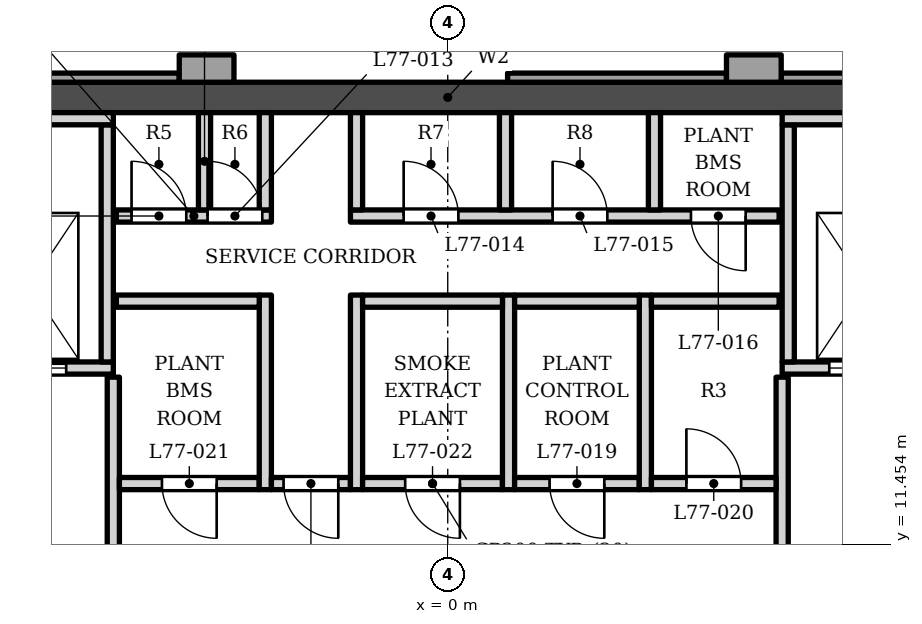
"""IFC4 building model, lengths in metres.
Left out: names, types, materials, properties, quantities, classifications, styles, units other than length and angle.
Written with IfcOpenShell. Run it as: python <this file> out.ifc"""

import sys

from ifc_helpers import new_model, si_unit, direction, frame, frame_2d, origin, place, context, subcontext, project, spatial, polyline, rectangle, outline, extrude, element, fill, save


model = new_model("IFC4")
c1 = context("Model", 3, precision=1e-05, world=origin(), true_north=direction((0.0, 1.0)))
c2 = subcontext(c1, "Body", "Model", "MODEL_VIEW")
j1 = project(units=[si_unit("LENGTHUNIT", "METRE"), si_unit("PLANEANGLEUNIT", "RADIAN")], contexts=[c1])
p1 = place(None, origin())
s1 = spatial("IfcSite", under=j1, at=p1, CompositionType="ELEMENT")
p2 = place(p1, origin())
s2 = spatial("IfcBuilding", under=s1, at=p2, CompositionType="ELEMENT")
p3 = place(p2, frame((0.0, 0.0, 330.5)))
s3 = spatial("IfcBuildingStorey", under=s2, at=p3, CompositionType="ELEMENT", Elevation=330.5)
p4 = place(p3, frame((-12.1, 18.802, 0.0), z_axis=(0.0, 0.0, 1.0), x_axis=(1.0, 0.0, 0.0)))
e1 = element("IfcWall", 1, at=p4, inside=s3, PredefinedType="SHEAR", context=c2, shape_type="SweptSolid", body=[
    extrude(rectangle(XDim=24.2, YDim=0.5, at=frame_2d((12.1, 0.0))), origin(), (0.0, 0.0, 1.0), 5.0),
])
p5 = place(p3, origin())
e2 = element("IfcWall", 2, at=p5, inside=s3, PredefinedType="SOLIDWALL", context=c2, shape_type="SweptSolid", body=[
    extrude(outline(polyline([(4.584, 19.502), (4.584, 19.052), (5.484, 19.052), (5.484, 19.502), (4.584, 19.502)])), origin(), (0.0, 0.0, 1.0), 3.8),
])
p6 = place(p3, origin())
e3 = element("IfcWall", 3, at=p6, inside=s3, PredefinedType="SOLIDWALL", context=c2, shape_type="SweptSolid", body=[
    extrude(outline(polyline([(-4.416, 19.502), (-4.416, 19.052), (-3.516, 19.052), (-3.516, 19.502), (-4.416, 19.502)])), origin(), (0.0, 0.0, 1.0), 3.8),
])
p7 = place(p3, origin())
e4 = element("IfcWall", 4, at=p7, inside=s3, PredefinedType="ELEMENTEDWALL", context=c2, shape_type="SweptSolid", body=[
    extrude(outline(polyline([(9.084, 19.203), (5.484, 19.203), (5.484, 19.052), (9.084, 19.052), (9.084, 19.203)])), origin(), (0.0, 0.0, 1.0), 3.8),
])
p8 = place(p3, origin())
e5 = element("IfcWall", 5, at=p8, inside=s3, PredefinedType="ELEMENTEDWALL", context=c2, shape_type="SweptSolid", body=[
    extrude(outline(polyline([(4.584, 19.203), (0.984, 19.203), (0.984, 19.052), (4.584, 19.052), (4.584, 19.203)])), origin(), (0.0, 0.0, 1.0), 3.8),
])
p9 = place(p3, origin())
e6 = element("IfcWall", 6, at=p9, inside=s3, PredefinedType="ELEMENTEDWALL", context=c2, shape_type="SweptSolid", body=[
    extrude(outline(polyline([(-4.416, 19.203), (-8.016, 19.203), (-8.016, 19.052), (-4.416, 19.052), (-4.416, 19.203)])), origin(), (0.0, 0.0, 1.0), 3.8),
])
p10 = place(p3, frame((-5.5, 6.353, 0.0), z_axis=(0.0, 0.0, 1.0), x_axis=(0.0, 1.0, 0.0)))
e7 = element("IfcWall", 7, at=p10, inside=s3, PredefinedType="SOLIDWALL", context=c2, shape_type="SweptSolid", body=[
    extrude(rectangle(XDim=7.85, YDim=0.2, at=frame_2d((3.925, 0.0))), origin(), (0.0, 0.0, 1.0), 4.8),
])
p11 = place(p10, frame((3.6, 0.0, 0.0)))
e8 = element("IfcOpeningElement", 8, at=p11, cuts=e7, PredefinedType="OPENING", context=c2, shape_type="SweptSolid", body=[
    extrude(rectangle(XDim=1.4, YDim=2.1, at=frame_2d((0.7, 1.05))), frame((0.0, 0.11, 0.0), z_axis=(0.0, -1.0, 0.0), x_axis=(1.0, 0.0, 0.0)), (0.0, 0.0, 1.0), 0.22),
])
p12 = place(p3, frame((5.5, 6.353, 0.0), z_axis=(0.0, 0.0, 1.0), x_axis=(0.0, 1.0, 0.0)))
e9 = element("IfcWall", 9, at=p12, inside=s3, PredefinedType="SOLIDWALL", context=c2, shape_type="SweptSolid", body=[
    extrude(rectangle(XDim=7.85, YDim=0.2, at=frame_2d((3.925, 0.0))), origin(), (0.0, 0.0, 1.0), 4.8),
])
p13 = place(p12, frame((3.6, 0.0, 0.0)))
e10 = element("IfcOpeningElement", 10, at=p13, cuts=e9, PredefinedType="OPENING", context=c2, shape_type="SweptSolid", body=[
    extrude(rectangle(XDim=1.4, YDim=2.1, at=frame_2d((0.7, 1.05))), frame((0.0, 0.11, 0.0), z_axis=(0.0, -1.0, 0.0), x_axis=(1.0, 0.0, 0.0)), (0.0, 0.0, 1.0), 0.22),
])
p14 = place(p3, frame((-5.4, 12.453, 0.0), z_axis=(0.0, 0.0, 1.0), x_axis=(1.0, 0.0, 0.0)))
e11 = element("IfcWall", 11, at=p14, inside=s3, PredefinedType="PARTITIONING", context=c2, shape_type="SweptSolid", body=[
    extrude(rectangle(XDim=2.3, YDim=0.2, at=frame_2d((1.15, 0.0))), origin(), (0.0, 0.0, 1.0), 4.8),
])
p15 = place(p14, frame((0.7, 0.0, 0.0)))
e12 = element("IfcOpeningElement", 12, at=p15, cuts=e11, PredefinedType="OPENING", context=c2, shape_type="SweptSolid", body=[
    extrude(rectangle(XDim=0.9, YDim=2.1, at=frame_2d((0.45, 1.05))), frame((0.0, 0.11, 0.0), z_axis=(0.0, -1.0, 0.0), x_axis=(1.0, 0.0, 0.0)), (0.0, 0.0, 1.0), 0.22),
])
p16 = place(p3, frame((-3.0, 12.353, 0.0), z_axis=(0.0, 0.0, 1.0), x_axis=(0.0, 1.0, 0.0)))
e13 = element("IfcWall", 13, at=p16, inside=s3, PredefinedType="PARTITIONING", context=c2, shape_type="SweptSolid", body=[
    extrude(rectangle(XDim=3.2, YDim=0.2, at=frame_2d((1.6, 0.0))), origin(), (0.0, 0.0, 1.0), 4.8),
])
p17 = place(p3, frame((-2.9, 12.453, 0.0), z_axis=(0.0, 0.0, 1.0), x_axis=(1.0, 0.0, 0.0)))
e14 = element("IfcWall", 14, at=p17, inside=s3, PredefinedType="PARTITIONING", context=c2, shape_type="SweptSolid", body=[
    extrude(rectangle(XDim=1.3, YDim=0.2, at=frame_2d((0.65, 0.0))), origin(), (0.0, 0.0, 1.0), 4.8),
])
p18 = place(p17, frame((0.2, 0.0, 0.0)))
e15 = element("IfcOpeningElement", 15, at=p18, cuts=e14, PredefinedType="OPENING", context=c2, shape_type="SweptSolid", body=[
    extrude(rectangle(XDim=0.9, YDim=2.1, at=frame_2d((0.45, 1.05))), frame((0.0, 0.11, 0.0), z_axis=(0.0, -1.0, 0.0), x_axis=(1.0, 0.0, 0.0)), (0.0, 0.0, 1.0), 0.22),
])
p19 = place(p3, frame((-1.5, 12.353, 0.0), z_axis=(0.0, 0.0, 1.0), x_axis=(0.0, 1.0, 0.0)))
e16 = element("IfcWall", 16, at=p19, inside=s3, PredefinedType="PARTITIONING", context=c2, shape_type="SweptSolid", body=[
    extrude(rectangle(XDim=3.2, YDim=0.2, at=frame_2d((1.6, 0.0))), origin(), (0.0, 0.0, 1.0), 4.8),
])
p20 = place(p3, frame((-1.4, 12.453, 0.0), z_axis=(0.0, 0.0, 1.0), x_axis=(1.0, 0.0, 0.0)))
e17 = element("IfcWall", 17, at=p20, inside=s3, PredefinedType="PARTITIONING", context=c2, shape_type="SweptSolid", body=[
    extrude(rectangle(XDim=2.3, YDim=0.2, at=frame_2d((1.15, 0.0))), origin(), (0.0, 0.0, 1.0), 4.8),
])
p21 = place(p20, frame((0.7, 0.0, 0.0)))
e18 = element("IfcOpeningElement", 18, at=p21, cuts=e17, PredefinedType="OPENING", context=c2, shape_type="SweptSolid", body=[
    extrude(rectangle(XDim=0.9, YDim=2.1, at=frame_2d((0.45, 1.05))), frame((0.0, 0.11, 0.0), z_axis=(0.0, -1.0, 0.0), x_axis=(1.0, 0.0, 0.0)), (0.0, 0.0, 1.0), 0.22),
])
p22 = place(p3, frame((1.0, 12.353, 0.0), z_axis=(0.0, 0.0, 1.0), x_axis=(0.0, 1.0, 0.0)))
e19 = element("IfcWall", 19, at=p22, inside=s3, PredefinedType="PARTITIONING", context=c2, shape_type="SweptSolid", body=[
    extrude(rectangle(XDim=3.2, YDim=0.2, at=frame_2d((1.6, 0.0))), origin(), (0.0, 0.0, 1.0), 4.8),
])
p23 = place(p3, frame((1.1, 12.453, 0.0), z_axis=(0.0, 0.0, 1.0), x_axis=(1.0, 0.0, 0.0)))
e20 = element("IfcWall", 20, at=p23, inside=s3, PredefinedType="PARTITIONING", context=c2, shape_type="SweptSolid", body=[
    extrude(rectangle(XDim=2.05, YDim=0.2, at=frame_2d((1.025, 0.0))), origin(), (0.0, 0.0, 1.0), 4.8),
])
p24 = place(p23, frame((0.575, 0.0, 0.0)))
e21 = element("IfcOpeningElement", 21, at=p24, cuts=e20, PredefinedType="OPENING", context=c2, shape_type="SweptSolid", body=[
    extrude(rectangle(XDim=0.9, YDim=2.1, at=frame_2d((0.45, 1.05))), frame((0.0, 0.11, 0.0), z_axis=(0.0, -1.0, 0.0), x_axis=(1.0, 0.0, 0.0)), (0.0, 0.0, 1.0), 0.22),
])
p25 = place(p3, frame((3.25, 12.353, 0.0), z_axis=(0.0, 0.0, 1.0), x_axis=(0.0, 1.0, 0.0)))
e22 = element("IfcWall", 22, at=p25, inside=s3, PredefinedType="PARTITIONING", context=c2, shape_type="SweptSolid", body=[
    extrude(rectangle(XDim=3.2, YDim=0.2, at=frame_2d((1.6, 0.0))), origin(), (0.0, 0.0, 1.0), 4.8),
])
p26 = place(p3, frame((3.35, 12.453, 0.0), z_axis=(0.0, 0.0, 1.0), x_axis=(1.0, 0.0, 0.0)))
e23 = element("IfcWall", 23, at=p26, inside=s3, PredefinedType="PARTITIONING", context=c2, shape_type="SweptSolid", body=[
    extrude(rectangle(XDim=2.05, YDim=0.2, at=frame_2d((1.025, 0.0))), origin(), (0.0, 0.0, 1.0), 4.8),
])
p27 = place(p26, frame((0.575, 0.0, 0.0)))
e24 = element("IfcOpeningElement", 24, at=p27, cuts=e23, PredefinedType="OPENING", context=c2, shape_type="SweptSolid", body=[
    extrude(rectangle(XDim=0.9, YDim=2.1, at=frame_2d((0.45, 1.05))), frame((0.0, 0.11, 0.0), z_axis=(0.0, -1.0, 0.0), x_axis=(1.0, 0.0, 0.0)), (0.0, 0.0, 1.0), 0.22),
])
p28 = place(p3, frame((-8.05, 14.353, 0.0), z_axis=(0.0, 0.0, 1.0), x_axis=(1.0, 0.0, 0.0)))
e25 = element("IfcWall", 25, at=p28, inside=s3, PredefinedType="SOLIDWALL", context=c2, shape_type="SweptSolid", body=[
    extrude(rectangle(XDim=2.55, YDim=0.2, at=frame_2d((1.275, 0.0))), origin(), (0.0, 0.0, 1.0), 4.8),
])
p29 = place(p28, frame((0.575, 0.0, 0.0)))
e26 = element("IfcOpeningElement", 26, at=p29, cuts=e25, PredefinedType="OPENING", context=c2, shape_type="SweptSolid", body=[
    extrude(rectangle(XDim=1.2, YDim=2.1, at=frame_2d((0.6, 1.05))), frame((0.0, 0.11, 0.0), z_axis=(0.0, -1.0, 0.0), x_axis=(1.0, 0.0, 0.0)), (0.0, 0.0, 1.0), 0.22),
])
p30 = place(p3, frame((5.5, 14.353, 0.0), z_axis=(0.0, 0.0, 1.0), x_axis=(1.0, 0.0, 0.0)))
e27 = element("IfcWall", 27, at=p30, inside=s3, PredefinedType="SOLIDWALL", context=c2, shape_type="SweptSolid", body=[
    extrude(rectangle(XDim=2.55, YDim=0.2, at=frame_2d((1.275, 0.0))), origin(), (0.0, 0.0, 1.0), 4.8),
])
p31 = place(p30, frame((0.775, 0.0, 0.0)))
e28 = element("IfcOpeningElement", 28, at=p31, cuts=e27, PredefinedType="OPENING", context=c2, shape_type="SweptSolid", body=[
    extrude(rectangle(XDim=1.2, YDim=2.1, at=frame_2d((0.6, 1.05))), frame((0.0, 0.11, 0.0), z_axis=(0.0, -1.0, 0.0), x_axis=(1.0, 0.0, 0.0)), (0.0, 0.0, 1.0), 0.22),
])
for number, where, z_axis, x_axis in (
    (29, (-5.6, 14.453, 0.0), (0.0, 0.0, 1.0), (0.0, 1.0, 0.0)),
    (30, (5.6, 14.453, 0.0), (0.0, 0.0, 1.0), (0.0, 1.0, 0.0)),
):
    element("IfcWall", number, at=place(p3, frame(where, z_axis=z_axis, x_axis=x_axis)), inside=s3, PredefinedType="SOLIDWALL", context=c2, shape_type="SweptSolid", body=[
        extrude(rectangle(XDim=3.9, YDim=0.2, at=frame_2d((1.95, 0.0))), origin(), (0.0, 0.0, 1.0), 4.8),
    ])
p32 = place(p3, frame((-5.45, 15.453, 0.0), z_axis=(0.0, 0.0, 1.0), x_axis=(1.0, 0.0, 0.0)))
e31 = element("IfcWall", 31, at=p32, inside=s3, PredefinedType="SOLIDWALL", context=c2, shape_type="SweptSolid", body=[
    extrude(rectangle(XDim=2.35, YDim=0.2, at=frame_2d((1.175, 0.0))), origin(), (0.0, 0.0, 1.0), 4.8),
])
p33 = place(p3, frame((-1.4, 15.453, 0.0), z_axis=(0.0, 0.0, 1.0), x_axis=(1.0, 0.0, 0.0)))
e32 = element("IfcWall", 32, at=p33, inside=s3, PredefinedType="PARTITIONING", context=c2, shape_type="SweptSolid", body=[
    extrude(rectangle(XDim=2.3, YDim=0.2, at=frame_2d((1.15, 0.0))), origin(), (0.0, 0.0, 1.0), 4.8),
])
p34 = place(p3, frame((1.1, 15.453, 0.0), z_axis=(0.0, 0.0, 1.0), x_axis=(1.0, 0.0, 0.0)))
e33 = element("IfcWall", 33, at=p34, inside=s3, PredefinedType="PARTITIONING", context=c2, shape_type="SweptSolid", body=[
    extrude(rectangle(XDim=2.05, YDim=0.2, at=frame_2d((1.025, 0.0))), origin(), (0.0, 0.0, 1.0), 4.8),
])
p35 = place(p3, frame((3.35, 15.453, 0.0), z_axis=(0.0, 0.0, 1.0), x_axis=(1.0, 0.0, 0.0)))
e34 = element("IfcWall", 34, at=p35, inside=s3, PredefinedType="SOLIDWALL", context=c2, shape_type="SweptSolid", body=[
    extrude(rectangle(XDim=2.1, YDim=0.2, at=frame_2d((1.05, 0.0))), origin(), (0.0, 0.0, 1.0), 4.8),
])
p36 = place(p3, frame((-5.45, 16.853, 0.0), z_axis=(0.0, 0.0, 1.0), x_axis=(1.0, 0.0, 0.0)))
e35 = element("IfcWall", 35, at=p36, inside=s3, PredefinedType="SOLIDWALL", context=c2, shape_type="SweptSolid", body=[
    extrude(rectangle(XDim=2.55, YDim=0.2, at=frame_2d((1.275, 0.0))), origin(), (0.0, 0.0, 1.0), 4.8),
])
p37 = place(p36, frame((0.25, 0.0, 0.0)))
e36 = element("IfcOpeningElement", 36, at=p37, cuts=e35, PredefinedType="OPENING", context=c2, shape_type="SweptSolid", body=[
    extrude(rectangle(XDim=0.9, YDim=2.1, at=frame_2d((0.45, 1.05))), frame((0.0, 0.11, 0.0), z_axis=(0.0, -1.0, 0.0), x_axis=(1.0, 0.0, 0.0)), (0.0, 0.0, 1.0), 0.22),
])
p38 = place(p36, frame((1.5, 0.0, 0.0)))
e37 = element("IfcOpeningElement", 37, at=p38, cuts=e35, PredefinedType="OPENING", context=c2, shape_type="SweptSolid", body=[
    extrude(rectangle(XDim=0.9, YDim=2.1, at=frame_2d((0.45, 1.05))), frame((0.0, 0.11, 0.0), z_axis=(0.0, -1.0, 0.0), x_axis=(1.0, 0.0, 0.0)), (0.0, 0.0, 1.0), 0.22),
])
p39 = place(p3, frame((-1.6, 16.853, 0.0), z_axis=(0.0, 0.0, 1.0), x_axis=(1.0, 0.0, 0.0)))
e38 = element("IfcWall", 38, at=p39, inside=s3, PredefinedType="SOLIDWALL", context=c2, shape_type="SweptSolid", body=[
    extrude(rectangle(XDim=7.05, YDim=0.2, at=frame_2d((3.525, 0.0))), origin(), (0.0, 0.0, 1.0), 4.8),
])
p40 = place(p39, frame((0.875, 0.0, 0.0)))
e39 = element("IfcOpeningElement", 39, at=p40, cuts=e38, PredefinedType="OPENING", context=c2, shape_type="SweptSolid", body=[
    extrude(rectangle(XDim=0.9, YDim=2.1, at=frame_2d((0.45, 1.05))), frame((0.0, 0.11, 0.0), z_axis=(0.0, -1.0, 0.0), x_axis=(1.0, 0.0, 0.0)), (0.0, 0.0, 1.0), 0.22),
])
p41 = place(p39, frame((3.325, 0.0, 0.0)))
e40 = element("IfcOpeningElement", 40, at=p41, cuts=e38, PredefinedType="OPENING", context=c2, shape_type="SweptSolid", body=[
    extrude(rectangle(XDim=0.9, YDim=2.1, at=frame_2d((0.45, 1.05))), frame((0.0, 0.11, 0.0), z_axis=(0.0, -1.0, 0.0), x_axis=(1.0, 0.0, 0.0)), (0.0, 0.0, 1.0), 0.22),
])
p42 = place(p39, frame((5.6, 0.0, 0.0)))
e41 = element("IfcOpeningElement", 41, at=p42, cuts=e38, PredefinedType="OPENING", context=c2, shape_type="SweptSolid", body=[
    extrude(rectangle(XDim=0.9, YDim=2.1, at=frame_2d((0.45, 1.05))), frame((0.0, 0.11, 0.0), z_axis=(0.0, -1.0, 0.0), x_axis=(1.0, 0.0, 0.0)), (0.0, 0.0, 1.0), 0.22),
])
for number, where, z_axis, x_axis in (
    (42, (-4.0, 16.953, 0.0), (0.0, 0.0, 1.0), (0.0, 1.0, 0.0)),
    (43, (-3.0, 16.953, 0.0), (0.0, 0.0, 1.0), (0.0, 1.0, 0.0)),
    (44, (-1.5, 16.953, 0.0), (0.0, 0.0, 1.0), (0.0, 1.0, 0.0)),
    (45, (0.95, 16.953, 0.0), (0.0, 0.0, 1.0), (0.0, 1.0, 0.0)),
    (46, (3.4, 16.953, 0.0), (0.0, 0.0, 1.0), (0.0, 1.0, 0.0)),
):
    element("IfcWall", number, at=place(p3, frame(where, z_axis=z_axis, x_axis=x_axis)), inside=s3, PredefinedType="PARTITIONING", context=c2, shape_type="SweptSolid", body=[
        extrude(rectangle(XDim=1.6, YDim=0.2, at=frame_2d((0.8, 0.0))), origin(), (0.0, 0.0, 1.0), 4.8),
    ])
for number, where, z_axis, x_axis in (
    (47, (-8.05, 18.453, 0.0), (0.0, 0.0, 1.0), (1.0, 0.0, 0.0)),
    (48, (5.5, 18.453, 0.0), (0.0, 0.0, 1.0), (1.0, 0.0, 0.0)),
):
    element("IfcWall", number, at=place(p3, frame(where, z_axis=z_axis, x_axis=x_axis)), inside=s3, PredefinedType="SOLIDWALL", context=c2, shape_type="SweptSolid", body=[
        extrude(rectangle(XDim=2.55, YDim=0.2, at=frame_2d((1.275, 0.0))), origin(), (0.0, 0.0, 1.0), 4.8),
    ])
p43 = place(p29, origin())
e49 = element("IfcDoor", 49, at=p43, inside=s3, OperationType="DOUBLE_DOOR_SLIDING", PredefinedType="DOOR", context=c2, shape_type="SweptSolid", body=[
    extrude(rectangle(XDim=1.2, YDim=2.1, at=frame_2d((0.6, 1.05))), frame((0.0, 0.025, 0.0), z_axis=(0.0, -1.0, 0.0), x_axis=(1.0, 0.0, 0.0)), (0.0, 0.0, 1.0), 0.05),
])
fill(e26, e49)
p44 = place(p31, origin())
e50 = element("IfcDoor", 50, at=p44, inside=s3, OperationType="DOUBLE_DOOR_SLIDING", PredefinedType="DOOR", context=c2, shape_type="SweptSolid", body=[
    extrude(rectangle(XDim=1.2, YDim=2.1, at=frame_2d((0.6, 1.05))), frame((0.0, 0.025, 0.0), z_axis=(0.0, -1.0, 0.0), x_axis=(1.0, 0.0, 0.0)), (0.0, 0.0, 1.0), 0.05),
])
fill(e28, e50)
p45 = place(p18, origin())
e51 = element("IfcDoor", 51, at=p45, inside=s3, OperationType="SINGLE_SWING_RIGHT", PredefinedType="DOOR", context=c2, shape_type="SweptSolid", body=[
    extrude(rectangle(XDim=0.9, YDim=2.1, at=frame_2d((0.45, 1.05))), frame((0.0, 0.025, 0.0), z_axis=(0.0, -1.0, 0.0), x_axis=(1.0, 0.0, 0.0)), (0.0, 0.0, 1.0), 0.05),
])
fill(e15, e51)
p46 = place(p37, origin())
e52 = element("IfcDoor", 52, at=p46, inside=s3, OperationType="SINGLE_SWING_LEFT", PredefinedType="DOOR", context=c2, shape_type="SweptSolid", body=[
    extrude(rectangle(XDim=0.9, YDim=2.1, at=frame_2d((0.45, 1.05))), frame((0.0, 0.025, 0.0), z_axis=(0.0, -1.0, 0.0), x_axis=(1.0, 0.0, 0.0)), (0.0, 0.0, 1.0), 0.05),
])
fill(e36, e52)
p47 = place(p38, origin())
e53 = element("IfcDoor", 53, at=p47, inside=s3, OperationType="SINGLE_SWING_LEFT", PredefinedType="DOOR", context=c2, shape_type="SweptSolid", body=[
    extrude(rectangle(XDim=0.9, YDim=2.1, at=frame_2d((0.45, 1.05))), frame((0.0, 0.025, 0.0), z_axis=(0.0, -1.0, 0.0), x_axis=(1.0, 0.0, 0.0)), (0.0, 0.0, 1.0), 0.05),
])
fill(e37, e53)
p48 = place(p40, origin())
e54 = element("IfcDoor", 54, at=p48, inside=s3, OperationType="SINGLE_SWING_LEFT", PredefinedType="DOOR", context=c2, shape_type="SweptSolid", body=[
    extrude(rectangle(XDim=0.9, YDim=2.1, at=frame_2d((0.45, 1.05))), frame((0.0, 0.025, 0.0), z_axis=(0.0, -1.0, 0.0), x_axis=(1.0, 0.0, 0.0)), (0.0, 0.0, 1.0), 0.05),
])
fill(e39, e54)
p49 = place(p41, origin())
e55 = element("IfcDoor", 55, at=p49, inside=s3, OperationType="SINGLE_SWING_LEFT", PredefinedType="DOOR", context=c2, shape_type="SweptSolid", body=[
    extrude(rectangle(XDim=0.9, YDim=2.1, at=frame_2d((0.45, 1.05))), frame((0.0, 0.025, 0.0), z_axis=(0.0, -1.0, 0.0), x_axis=(1.0, 0.0, 0.0)), (0.0, 0.0, 1.0), 0.05),
])
fill(e40, e55)
p50 = place(p42, origin())
e56 = element("IfcDoor", 56, at=p50, inside=s3, OperationType="SINGLE_SWING_RIGHT", PredefinedType="DOOR", context=c2, shape_type="SweptSolid", body=[
    extrude(rectangle(XDim=0.9, YDim=2.1, at=frame_2d((0.45, 1.05))), frame((0.0, 0.025, 0.0), z_axis=(0.0, -1.0, 0.0), x_axis=(1.0, 0.0, 0.0)), (0.0, 0.0, 1.0), 0.05),
])
fill(e41, e56)
p51 = place(p24, origin())
e57 = element("IfcDoor", 57, at=p51, inside=s3, OperationType="SINGLE_SWING_RIGHT", PredefinedType="DOOR", context=c2, shape_type="SweptSolid", body=[
    extrude(rectangle(XDim=0.9, YDim=2.1, at=frame_2d((0.45, 1.05))), frame((0.0, 0.025, 0.0), z_axis=(0.0, -1.0, 0.0), x_axis=(1.0, 0.0, 0.0)), (0.0, 0.0, 1.0), 0.05),
])
fill(e21, e57)
p52 = place(p27, origin())
e58 = element("IfcDoor", 58, at=p52, inside=s3, OperationType="SINGLE_SWING_LEFT", PredefinedType="DOOR", context=c2, shape_type="SweptSolid", body=[
    extrude(rectangle(XDim=0.9, YDim=2.1, at=frame_2d((0.45, 1.05))), frame((0.0, 0.025, 0.0), z_axis=(0.0, -1.0, 0.0), x_axis=(1.0, 0.0, 0.0)), (0.0, 0.0, 1.0), 0.05),
])
fill(e24, e58)
p53 = place(p15, origin())
e59 = element("IfcDoor", 59, at=p53, inside=s3, OperationType="SINGLE_SWING_RIGHT", PredefinedType="DOOR", context=c2, shape_type="SweptSolid", body=[
    extrude(rectangle(XDim=0.9, YDim=2.1, at=frame_2d((0.45, 1.05))), frame((0.0, 0.025, 0.0), z_axis=(0.0, -1.0, 0.0), x_axis=(1.0, 0.0, 0.0)), (0.0, 0.0, 1.0), 0.05),
])
fill(e12, e59)
p54 = place(p21, origin())
e60 = element("IfcDoor", 60, at=p54, inside=s3, OperationType="SINGLE_SWING_RIGHT", PredefinedType="DOOR", context=c2, shape_type="SweptSolid", body=[
    extrude(rectangle(XDim=0.9, YDim=2.1, at=frame_2d((0.45, 1.05))), frame((0.0, 0.025, 0.0), z_axis=(0.0, -1.0, 0.0), x_axis=(1.0, 0.0, 0.0)), (0.0, 0.0, 1.0), 0.05),
])
fill(e18, e60)
save(model, sys.argv[1])
